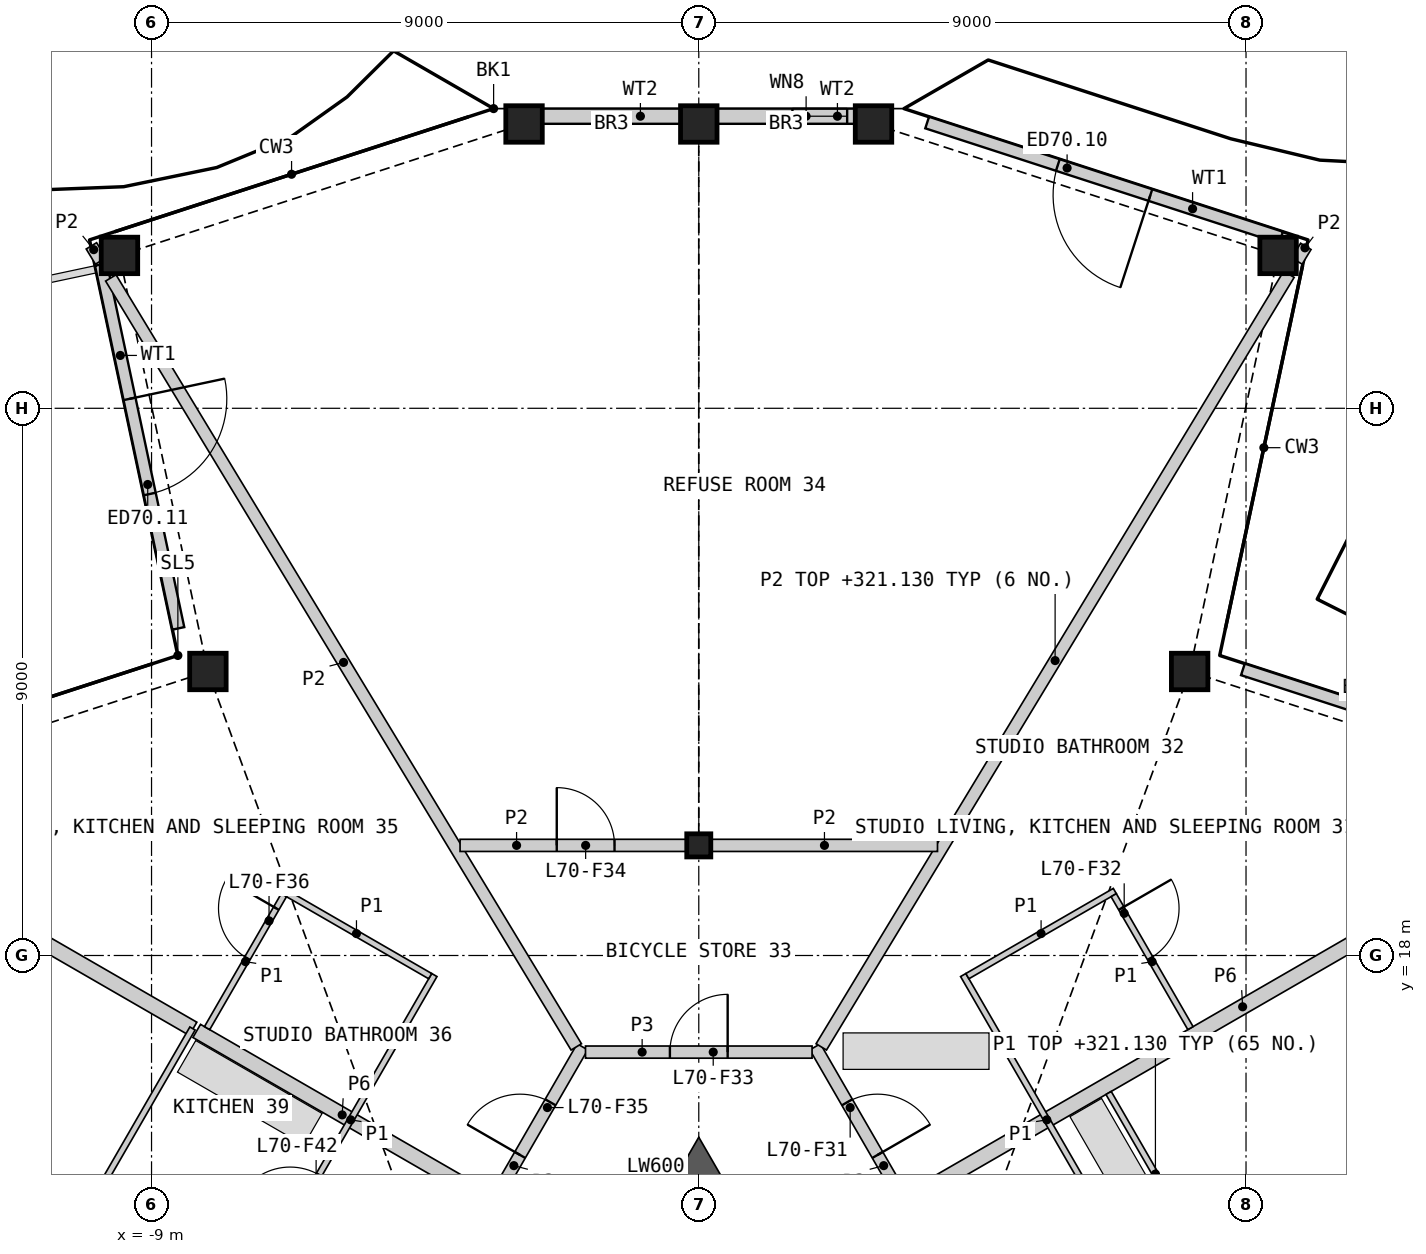
"""IFC4 building model, lengths in metres.
Left out: names, types, materials, properties, quantities, classifications, styles, units other than length and angle.
Written with IfcOpenShell. Run it as: python <this file> out.ifc"""

import sys

from ifc_helpers import new_model, si_unit, direction, frame, frame_2d, origin, origin_2d, place, context, subcontext, project, spatial, polyline, rectangle, hollow_rectangle, i_section, outline, extrude, element, fill, save


model = new_model("IFC4")
c1 = context("Model", 3, precision=1e-05, world=origin(), true_north=direction((0.0, 1.0)))
c2 = subcontext(c1, "Body", "Model", "MODEL_VIEW")
j1 = project(units=[si_unit("LENGTHUNIT", "METRE"), si_unit("PLANEANGLEUNIT", "RADIAN")], contexts=[c1])
p1 = place(None, origin())
s1 = spatial("IfcSite", under=j1, at=p1, CompositionType="ELEMENT")
p2 = place(p1, origin())
s2 = spatial("IfcBuilding", under=s1, at=p2, CompositionType="ELEMENT")
p3 = place(p2, frame((0.0, 0.0, 318.8)))
s3 = spatial("IfcBuildingStorey", under=s2, at=p3, CompositionType="ELEMENT", Elevation=318.8)
for number, where, z_axis, x_axis in (
    (1, (8.073, 22.671, 0.0), (0.0, 0.0, 1.0), (1.0, 0.0, 0.0)),
    (2, (9.527, 29.514, 0.0), (0.0, 0.0, 1.0), (1.0, 0.0, 0.0)),
    (3, (2.874, 31.676, 0.0), (0.0, 0.0, 1.0), (1.0, 0.0, 0.0)),
    (4, (0.0, 31.676, 0.0), (0.0, 0.0, 1.0), (1.0, 0.0, 0.0)),
    (5, (-2.874, 31.676, 0.0), (0.0, 0.0, 1.0), (1.0, 0.0, 0.0)),
    (6, (-9.527, 29.514, 0.0), (0.0, 0.0, 1.0), (1.0, 0.0, 0.0)),
    (7, (-8.073, 22.671, 0.0), (0.0, 0.0, 1.0), (1.0, 0.0, 0.0)),
):
    element("IfcColumn", number, at=place(p3, frame(where, z_axis=z_axis, x_axis=x_axis)), inside=s3, PredefinedType="COLUMN", context=c2, shape_type="SweptSolid", body=[
        extrude(hollow_rectangle(XDim=0.6, YDim=0.6, WallThickness=0.04, at=origin_2d()), origin(), (0.0, 0.0, 1.0), 3.4),
    ])
p4 = place(p3, frame((0.0, 19.811, 0.0), z_axis=(0.0, 0.0, 1.0), x_axis=(1.0, 0.0, 0.0)))
e8 = element("IfcColumn", 8, at=p4, inside=s3, PredefinedType="COLUMN", context=c2, shape_type="SweptSolid", body=[
    extrude(i_section(OverallWidth=0.396, OverallDepth=0.381, WebThickness=0.019, FlangeThickness=0.03, at=origin_2d()), origin(), (0.0, 0.0, 1.0), 3.4),
])
p5 = place(p3, frame((14.769, 20.814, 0.0), z_axis=(0.0, 0.0, 1.0), x_axis=(-0.951069243123, 0.308977822483, 0.0)))
e9 = element("IfcWall", 9, at=p5, inside=s3, PredefinedType="SOLIDWALL", context=c2, shape_type="SweptSolid", body=[
    extrude(rectangle(XDim=6.12, YDim=0.2, at=frame_2d((3.06, 0.0))), origin(), (0.0, 0.0, 1.0), 2.488),
])
p6 = place(p5, frame((2.26, 0.0, 0.0)))
e10 = element("IfcOpeningElement", 10, at=p6, cuts=e9, PredefinedType="OPENING", context=c2, shape_type="SweptSolid", body=[
    extrude(rectangle(XDim=1.6, YDim=2.25, at=frame_2d((0.8, 1.125))), frame((0.0, 0.11, 0.0), z_axis=(0.0, -1.0, 0.0), x_axis=(1.0, 0.0, 0.0)), (0.0, 0.0, 1.0), 0.22),
])
p7 = place(p3, frame((9.576, 29.809, 0.0), z_axis=(0.0, 0.0, 1.0), x_axis=(-0.951053709789, 0.309025631781, 0.0)))
e11 = element("IfcWall", 11, at=p7, inside=s3, PredefinedType="SOLIDWALL", context=c2, shape_type="SweptSolid", body=[
    extrude(rectangle(XDim=6.12, YDim=0.2, at=frame_2d((3.06, 0.0))), origin(), (0.0, 0.0, 1.0), 2.488),
])
p8 = place(p7, frame((2.26, 0.0, 0.0)))
e12 = element("IfcOpeningElement", 12, at=p8, cuts=e11, PredefinedType="OPENING", context=c2, shape_type="SweptSolid", body=[
    extrude(rectangle(XDim=1.6, YDim=2.25, at=frame_2d((0.8, 1.125))), frame((0.0, 0.11, 0.0), z_axis=(0.0, -1.0, 0.0), x_axis=(1.0, 0.0, 0.0)), (0.0, 0.0, 1.0), 0.22),
])
p9 = place(p3, frame((2.94, 31.804, 0.0), z_axis=(0.0, 0.0, 1.0), x_axis=(-1.0, 0.0, 0.0)))
e13 = element("IfcWall", 13, at=p9, inside=s3, PredefinedType="SOLIDWALL", context=c2, shape_type="SweptSolid", body=[
    extrude(rectangle(XDim=2.64, YDim=0.25, at=frame_2d((1.32, 0.0))), origin(), (0.0, 0.0, 1.0), 2.488),
])
p10 = place(p9, frame((0.5, 0.0, 1.5)))
e14 = element("IfcOpeningElement", 14, at=p10, cuts=e13, PredefinedType="OPENING", context=c2, shape_type="SweptSolid", body=[
    extrude(rectangle(XDim=0.9, YDim=0.7, at=frame_2d((0.45, 0.35))), frame((0.0, 0.135, 0.0), z_axis=(0.0, -1.0, 0.0), x_axis=(1.0, 0.0, 0.0)), (0.0, 0.0, 1.0), 0.27),
])
p11 = place(p3, frame((-0.3, 31.804, 0.0), z_axis=(0.0, 0.0, 1.0), x_axis=(-1.0, 0.0, 0.0)))
e15 = element("IfcWall", 15, at=p11, inside=s3, PredefinedType="SOLIDWALL", context=c2, shape_type="SweptSolid", body=[
    extrude(rectangle(XDim=2.64, YDim=0.25, at=frame_2d((1.32, 0.0))), origin(), (0.0, 0.0, 1.0), 2.488),
])
p12 = place(p3, frame((-9.832, 29.366, 0.0), z_axis=(0.0, 0.0, 1.0), x_axis=(0.207932234858, -0.978143233738, 0.0)))
e16 = element("IfcWall", 16, at=p12, inside=s3, PredefinedType="SOLIDWALL", context=c2, shape_type="SweptSolid", body=[
    extrude(rectangle(XDim=6.12, YDim=0.2, at=frame_2d((3.06, 0.0))), origin(), (0.0, 0.0, 1.0), 2.488),
])
p13 = place(p12, frame((2.26, 0.0, 0.0)))
e17 = element("IfcOpeningElement", 17, at=p13, cuts=e16, PredefinedType="OPENING", context=c2, shape_type="SweptSolid", body=[
    extrude(rectangle(XDim=1.6, YDim=2.25, at=frame_2d((0.8, 1.125))), frame((0.0, 0.11, 0.0), z_axis=(0.0, -1.0, 0.0), x_axis=(1.0, 0.0, 0.0)), (0.0, 0.0, 1.0), 0.22),
])
p14 = place(p3, origin())
e18 = element("IfcWall", 18, at=p14, inside=s3, PredefinedType="SHEAR", context=c2, shape_type="SweptSolid", body=[
    extrude(outline(polyline([(0.0, 13.811), (-0.52, 14.111), (0.0, 15.011), (0.52, 14.111), (0.0, 13.811)])), origin(), (0.0, 0.0, 1.0), 3.1),
])
p15 = place(p3, frame((3.472, 13.997, 0.0), z_axis=(0.0, 0.0, 1.0), x_axis=(0.866029233976, 0.499993365855, 0.0)))
e19 = element("IfcWall", 19, at=p15, inside=s3, PredefinedType="PARTITIONING", context=c2, shape_type="SweptSolid", body=[
    extrude(rectangle(XDim=12.637, YDim=0.25, at=frame_2d((6.319, 0.0))), origin(), (0.0, 0.0, 1.0), 2.33),
])
p16 = place(p3, frame((-14.417, 20.316, 0.0), z_axis=(0.0, 0.0, 1.0), x_axis=(0.866022207469, -0.50000553614, 0.0)))
e20 = element("IfcWall", 20, at=p16, inside=s3, PredefinedType="PARTITIONING", context=c2, shape_type="SweptSolid", body=[
    extrude(rectangle(XDim=7.042, YDim=0.25, at=frame_2d((3.521, 0.0))), origin(), (0.0, 0.0, 1.0), 2.33),
])
p17 = place(p3, frame((-8.257, 16.76, 0.0), z_axis=(0.0, 0.0, 1.0), x_axis=(0.866034739526, -0.499983829672, 0.0)))
e21 = element("IfcWall", 21, at=p17, inside=s3, PredefinedType="PARTITIONING", context=c2, shape_type="SweptSolid", body=[
    extrude(rectangle(XDim=5.525, YDim=0.25, at=frame_2d((2.763, 0.0))), origin(), (0.0, 0.0, 1.0), 2.33),
])
p18 = place(p3, frame((1.913, 16.498, 0.0), z_axis=(0.0, 0.0, 1.0), x_axis=(0.499950370306, -0.866054055606, 0.0)))
e22 = element("IfcWall", 22, at=p18, inside=s3, PredefinedType="PARTITIONING", context=c2, shape_type="SweptSolid", body=[
    extrude(rectangle(XDim=4.513, YDim=0.2, at=frame_2d((2.256, 0.0))), origin(), (0.0, 0.0, 1.0), 3.1),
])
p19 = place(p18, frame((1.053, 0.0, 0.0)))
e23 = element("IfcOpeningElement", 23, at=p19, cuts=e22, PredefinedType="OPENING", context=c2, shape_type="SweptSolid", body=[
    extrude(rectangle(XDim=1.0, YDim=2.1, at=frame_2d((0.5, 1.05))), frame((0.0, 0.11, 0.0), z_axis=(0.0, -1.0, 0.0), x_axis=(1.0, 0.0, 0.0)), (0.0, 0.0, 1.0), 0.22),
])
p20 = place(p3, frame((-4.169, 12.59, 0.0), z_axis=(0.0, 0.0, 1.0), x_axis=(0.499950370306, 0.866054055606, 0.0)))
e24 = element("IfcWall", 24, at=p20, inside=s3, PredefinedType="PARTITIONING", context=c2, shape_type="SweptSolid", body=[
    extrude(rectangle(XDim=4.513, YDim=0.2, at=frame_2d((2.256, 0.0))), origin(), (0.0, 0.0, 1.0), 3.1),
])
p21 = place(p20, frame((2.459, 0.0, 0.0)))
e25 = element("IfcOpeningElement", 25, at=p21, cuts=e24, PredefinedType="OPENING", context=c2, shape_type="SweptSolid", body=[
    extrude(rectangle(XDim=1.0, YDim=2.1, at=frame_2d((0.5, 1.05))), frame((0.0, 0.11, 0.0), z_axis=(0.0, -1.0, 0.0), x_axis=(1.0, 0.0, 0.0)), (0.0, 0.0, 1.0), 0.22),
])
p22 = place(p3, frame((-1.863, 16.411, 0.0), z_axis=(0.0, 0.0, 1.0), x_axis=(1.0, 0.0, 0.0)))
e26 = element("IfcWall", 26, at=p22, inside=s3, PredefinedType="PARTITIONING", context=c2, shape_type="SweptSolid", body=[
    extrude(rectangle(XDim=3.726, YDim=0.2, at=frame_2d((1.863, 0.0))), origin(), (0.0, 0.0, 1.0), 3.1),
])
p23 = place(p22, frame((1.388, 0.0, 0.0)))
e27 = element("IfcOpeningElement", 27, at=p23, cuts=e26, PredefinedType="OPENING", context=c2, shape_type="SweptSolid", body=[
    extrude(rectangle(XDim=0.95, YDim=2.1, at=frame_2d((0.475, 1.05))), frame((0.0, 0.11, 0.0), z_axis=(0.0, -1.0, 0.0), x_axis=(1.0, 0.0, 0.0)), (0.0, 0.0, 1.0), 0.22),
])
p24 = place(p3, frame((2.015, 16.497, 0.0), z_axis=(0.0, 0.0, 1.0), x_axis=(0.517779253395, 0.855514257482, 0.0)))
e28 = element("IfcWall", 28, at=p24, inside=s3, PredefinedType="PARTITIONING", context=c2, shape_type="SweptSolid", body=[
    extrude(rectangle(XDim=14.854, YDim=0.2, at=frame_2d((7.427, 0.0))), origin(), (0.0, 0.0, 1.0), 2.33),
])
p25 = place(p3, frame((-9.669, 29.144, 0.0), z_axis=(0.0, 0.0, 1.0), x_axis=(0.517770554559, -0.85551952218, 0.0)))
e29 = element("IfcWall", 29, at=p25, inside=s3, PredefinedType="PARTITIONING", context=c2, shape_type="SweptSolid", body=[
    extrude(rectangle(XDim=14.784, YDim=0.2, at=frame_2d((7.392, 0.0))), origin(), (0.0, 0.0, 1.0), 2.33),
])
p26 = place(p3, frame((-3.926, 19.811, 0.0), z_axis=(0.0, 0.0, 1.0), x_axis=(1.0, 0.0, 0.0)))
e30 = element("IfcWall", 30, at=p26, inside=s3, PredefinedType="PARTITIONING", context=c2, shape_type="SweptSolid", body=[
    extrude(rectangle(XDim=3.718, YDim=0.2, at=frame_2d((1.859, 0.0))), origin(), (0.0, 0.0, 1.0), 2.33),
])
p27 = place(p26, frame((1.59, 0.0, 0.0)))
e31 = element("IfcOpeningElement", 31, at=p27, cuts=e30, PredefinedType="OPENING", context=c2, shape_type="SweptSolid", body=[
    extrude(rectangle(XDim=0.95, YDim=2.1, at=frame_2d((0.475, 1.05))), frame((0.0, 0.11, 0.0), z_axis=(0.0, -1.0, 0.0), x_axis=(1.0, 0.0, 0.0)), (0.0, 0.0, 1.0), 0.22),
])
p28 = place(p3, frame((0.208, 19.811, 0.0), z_axis=(0.0, 0.0, 1.0), x_axis=(1.0, 0.0, 0.0)))
e32 = element("IfcWall", 32, at=p28, inside=s3, PredefinedType="PARTITIONING", context=c2, shape_type="SweptSolid", body=[
    extrude(rectangle(XDim=3.718, YDim=0.2, at=frame_2d((1.859, 0.0))), origin(), (0.0, 0.0, 1.0), 2.33),
])
p29 = place(p3, frame((-9.989, 29.672, 0.0), z_axis=(0.0, 0.0, 1.0), x_axis=(0.517931387916, -0.855422163268, 0.0)))
e33 = element("IfcWall", 33, at=p29, inside=s3, PredefinedType="PARTITIONING", context=c2, shape_type="SweptSolid", body=[
    extrude(rectangle(XDim=0.292, YDim=0.2, at=frame_2d((0.146, 0.0))), origin(), (0.0, 0.0, 1.0), 2.33),
])
p30 = place(p3, frame((9.837, 29.422, 0.0), z_axis=(0.0, 0.0, 1.0), x_axis=(0.517419338909, 0.855731983581, 0.0)))
e34 = element("IfcWall", 34, at=p30, inside=s3, PredefinedType="PARTITIONING", context=c2, shape_type="SweptSolid", body=[
    extrude(rectangle(XDim=0.282, YDim=0.2, at=frame_2d((0.141, 0.0))), origin(), (0.0, 0.0, 1.0), 2.33),
])
p31 = place(p3, frame((6.74, 15.739, 0.0), z_axis=(0.0, 0.0, 1.0), x_axis=(0.499995022685, -0.86602827742, 0.0)))
e35 = element("IfcWall", 35, at=p31, inside=s3, PredefinedType="PARTITIONING", context=c2, shape_type="SweptSolid", body=[
    extrude(rectangle(XDim=15.404, YDim=0.1, at=frame_2d((7.702, 0.0))), origin(), (0.0, 0.0, 1.0), 2.33),
])
p32 = place(p31, frame((8.582, 0.0, 0.0)))
e36 = element("IfcOpeningElement", 36, at=p32, cuts=e35, PredefinedType="OPENING", context=c2, shape_type="SweptSolid", body=[
    extrude(rectangle(XDim=0.95, YDim=2.1, at=frame_2d((0.475, 1.05))), frame((0.0, 0.06, 0.0), z_axis=(0.0, -1.0, 0.0), x_axis=(1.0, 0.0, 0.0)), (0.0, 0.0, 1.0), 0.12),
])
p33 = place(p3, frame((-13.544, 7.762, 0.0), z_axis=(0.0, 0.0, 1.0), x_axis=(0.499993819111, 0.866028972293, 0.0)))
e37 = element("IfcWall", 37, at=p33, inside=s3, PredefinedType="PARTITIONING", context=c2, shape_type="SweptSolid", body=[
    extrude(rectangle(XDim=10.436, YDim=0.1, at=frame_2d((5.218, 0.0))), origin(), (0.0, 0.0, 1.0), 2.33),
])
p34 = place(p33, frame((3.279, 0.0, 0.0)))
e38 = element("IfcOpeningElement", 38, at=p34, cuts=e37, PredefinedType="OPENING", context=c2, shape_type="SweptSolid", body=[
    extrude(rectangle(XDim=0.95, YDim=2.1, at=frame_2d((0.475, 1.05))), frame((0.0, 0.06, 0.0), z_axis=(0.0, -1.0, 0.0), x_axis=(1.0, 0.0, 0.0)), (0.0, 0.0, 1.0), 0.12),
])
p35 = place(p3, frame((4.349, 17.679, 0.0), z_axis=(0.0, 0.0, 1.0), x_axis=(0.49997732567, -0.866038494419, 0.0)))
e39 = element("IfcWall", 39, at=p35, inside=s3, PredefinedType="PARTITIONING", context=c2, shape_type="SweptSolid", body=[
    extrude(rectangle(XDim=5.5, YDim=0.1, at=frame_2d((2.75, 0.0))), origin(), (0.0, 0.0, 1.0), 2.33),
])
p36 = place(p3, frame((-7.099, 12.915, 0.0), z_axis=(0.0, 0.0, 1.0), x_axis=(0.49997732567, 0.866038494419, 0.0)))
e40 = element("IfcWall", 40, at=p36, inside=s3, PredefinedType="PARTITIONING", context=c2, shape_type="SweptSolid", body=[
    extrude(rectangle(XDim=5.5, YDim=0.1, at=frame_2d((2.75, 0.0))), origin(), (0.0, 0.0, 1.0), 2.33),
])
p37 = place(p36, frame((0.756, 0.0, 0.0)))
e41 = element("IfcOpeningElement", 41, at=p37, cuts=e40, PredefinedType="OPENING", context=c2, shape_type="SweptSolid", body=[
    extrude(rectangle(XDim=0.95, YDim=2.1, at=frame_2d((0.475, 1.05))), frame((0.0, 0.06, 0.0), z_axis=(0.0, -1.0, 0.0), x_axis=(1.0, 0.0, 0.0)), (0.0, 0.0, 1.0), 0.12),
])
for number, where, z_axis, x_axis in (
    (42, (4.417, 17.66, 0.0), (0.0, 0.0, 1.0), (0.866, 0.5, 0.0)),
    (43, (-6.842, 19.06, 0.0), (0.0, 0.0, 1.0), (0.866, -0.5, 0.0)),
):
    element("IfcWall", number, at=place(p3, frame(where, z_axis=z_axis, x_axis=x_axis)), inside=s3, PredefinedType="PARTITIONING", context=c2, shape_type="SweptSolid", body=[
        extrude(rectangle(XDim=2.8, YDim=0.1, at=frame_2d((1.4, 0.0))), origin(), (0.0, 0.0, 1.0), 2.33),
    ])
p38 = place(p3, frame((6.824, 18.992, 0.0), z_axis=(0.0, 0.0, 1.0), x_axis=(0.50001820224, -0.866014894461, 0.0)))
e44 = element("IfcWall", 44, at=p38, inside=s3, PredefinedType="PARTITIONING", context=c2, shape_type="SweptSolid", body=[
    extrude(rectangle(XDim=2.525, YDim=0.1, at=frame_2d((1.262, 0.0))), origin(), (0.0, 0.0, 1.0), 2.33),
])
p39 = place(p38, frame((0.25, 0.0, 0.0)))
e45 = element("IfcOpeningElement", 45, at=p39, cuts=e44, PredefinedType="OPENING", context=c2, shape_type="SweptSolid", body=[
    extrude(rectangle(XDim=0.95, YDim=2.1, at=frame_2d((0.475, 1.05))), frame((0.0, 0.06, 0.0), z_axis=(0.0, -1.0, 0.0), x_axis=(1.0, 0.0, 0.0)), (0.0, 0.0, 1.0), 0.12),
])
p40 = place(p3, frame((-8.086, 16.805, 0.0), z_axis=(0.0, 0.0, 1.0), x_axis=(0.50001820224, 0.866014894461, 0.0)))
e46 = element("IfcWall", 46, at=p40, inside=s3, PredefinedType="PARTITIONING", context=c2, shape_type="SweptSolid", body=[
    extrude(rectangle(XDim=2.525, YDim=0.1, at=frame_2d((1.262, 0.0))), origin(), (0.0, 0.0, 1.0), 2.33),
])
p41 = place(p40, frame((1.325, 0.0, 0.0)))
e47 = element("IfcOpeningElement", 47, at=p41, cuts=e46, PredefinedType="OPENING", context=c2, shape_type="SweptSolid", body=[
    extrude(rectangle(XDim=0.95, YDim=2.1, at=frame_2d((0.475, 1.05))), frame((0.0, 0.06, 0.0), z_axis=(0.0, -1.0, 0.0), x_axis=(1.0, 0.0, 0.0)), (0.0, 0.0, 1.0), 0.12),
])
p42 = place(p8, origin())
e48 = element("IfcDoor", 48, at=p42, inside=s3, OperationType="DOUBLE_DOOR_SINGLE_SWING", PredefinedType="DOOR", context=c2, shape_type="SweptSolid", body=[
    extrude(rectangle(XDim=1.6, YDim=2.25, at=frame_2d((0.8, 1.125))), frame((0.0, 0.025, 0.0), z_axis=(0.0, -1.0, 0.0), x_axis=(1.0, 0.0, 0.0)), (0.0, 0.0, 1.0), 0.05),
])
fill(e12, e48)
p43 = place(p10, origin())
e49 = element("IfcWindow", 49, at=p43, inside=s3, PartitioningType="SINGLE_PANEL", PredefinedType="WINDOW", context=c2, shape_type="SweptSolid", body=[
    extrude(rectangle(XDim=0.9, YDim=0.7, at=frame_2d((0.45, 0.35))), frame((0.0, 0.03, 0.0), z_axis=(0.0, -1.0, 0.0), x_axis=(1.0, 0.0, 0.0)), (0.0, 0.0, 1.0), 0.06),
])
fill(e14, e49)
p44 = place(p13, origin())
e50 = element("IfcDoor", 50, at=p44, inside=s3, OperationType="DOUBLE_DOOR_SINGLE_SWING", PredefinedType="DOOR", context=c2, shape_type="SweptSolid", body=[
    extrude(rectangle(XDim=1.6, YDim=2.25, at=frame_2d((0.8, 1.125))), frame((0.0, 0.025, 0.0), z_axis=(0.0, -1.0, 0.0), x_axis=(1.0, 0.0, 0.0)), (0.0, 0.0, 1.0), 0.05),
])
fill(e17, e50)
p45 = place(p19, origin())
e51 = element("IfcDoor", 51, at=p45, inside=s3, OperationType="SINGLE_SWING_RIGHT", PredefinedType="DOOR", context=c2, shape_type="SweptSolid", body=[
    extrude(rectangle(XDim=1.0, YDim=2.1, at=frame_2d((0.5, 1.05))), frame((0.0, 0.025, 0.0), z_axis=(0.0, -1.0, 0.0), x_axis=(1.0, 0.0, 0.0)), (0.0, 0.0, 1.0), 0.05),
])
fill(e23, e51)
p46 = place(p39, origin())
e52 = element("IfcDoor", 52, at=p46, inside=s3, OperationType="SINGLE_SWING_LEFT", PredefinedType="DOOR", context=c2, shape_type="SweptSolid", body=[
    extrude(rectangle(XDim=0.95, YDim=2.1, at=frame_2d((0.475, 1.05))), frame((0.0, 0.025, 0.0), z_axis=(0.0, -1.0, 0.0), x_axis=(1.0, 0.0, 0.0)), (0.0, 0.0, 1.0), 0.05),
])
fill(e45, e52)
p47 = place(p23, origin())
e53 = element("IfcDoor", 53, at=p47, inside=s3, OperationType="SINGLE_SWING_RIGHT", PredefinedType="DOOR", context=c2, shape_type="SweptSolid", body=[
    extrude(rectangle(XDim=0.95, YDim=2.1, at=frame_2d((0.475, 1.05))), frame((0.0, 0.025, 0.0), z_axis=(0.0, -1.0, 0.0), x_axis=(1.0, 0.0, 0.0)), (0.0, 0.0, 1.0), 0.05),
])
fill(e27, e53)
p48 = place(p27, origin())
e54 = element("IfcDoor", 54, at=p48, inside=s3, OperationType="SINGLE_SWING_LEFT", PredefinedType="DOOR", context=c2, shape_type="SweptSolid", body=[
    extrude(rectangle(XDim=0.95, YDim=2.1, at=frame_2d((0.475, 1.05))), frame((0.0, 0.025, 0.0), z_axis=(0.0, -1.0, 0.0), x_axis=(1.0, 0.0, 0.0)), (0.0, 0.0, 1.0), 0.05),
])
fill(e31, e54)
p49 = place(p21, origin())
e55 = element("IfcDoor", 55, at=p49, inside=s3, OperationType="SINGLE_SWING_LEFT", PredefinedType="DOOR", context=c2, shape_type="SweptSolid", body=[
    extrude(rectangle(XDim=1.0, YDim=2.1, at=frame_2d((0.5, 1.05))), frame((0.0, 0.025, 0.0), z_axis=(0.0, -1.0, 0.0), x_axis=(1.0, 0.0, 0.0)), (0.0, 0.0, 1.0), 0.05),
])
fill(e25, e55)
p50 = place(p41, origin())
e56 = element("IfcDoor", 56, at=p50, inside=s3, OperationType="SINGLE_SWING_RIGHT", PredefinedType="DOOR", context=c2, shape_type="SweptSolid", body=[
    extrude(rectangle(XDim=0.95, YDim=2.1, at=frame_2d((0.475, 1.05))), frame((0.0, 0.025, 0.0), z_axis=(0.0, -1.0, 0.0), x_axis=(1.0, 0.0, 0.0)), (0.0, 0.0, 1.0), 0.05),
])
fill(e47, e56)
p51 = place(p37, origin())
e57 = element("IfcDoor", 57, at=p51, inside=s3, OperationType="SINGLE_SWING_LEFT", PredefinedType="DOOR", context=c2, shape_type="SweptSolid", body=[
    extrude(rectangle(XDim=0.95, YDim=2.1, at=frame_2d((0.475, 1.05))), frame((0.0, 0.025, 0.0), z_axis=(0.0, -1.0, 0.0), x_axis=(1.0, 0.0, 0.0)), (0.0, 0.0, 1.0), 0.05),
])
fill(e41, e57)
save(model, sys.argv[1])
